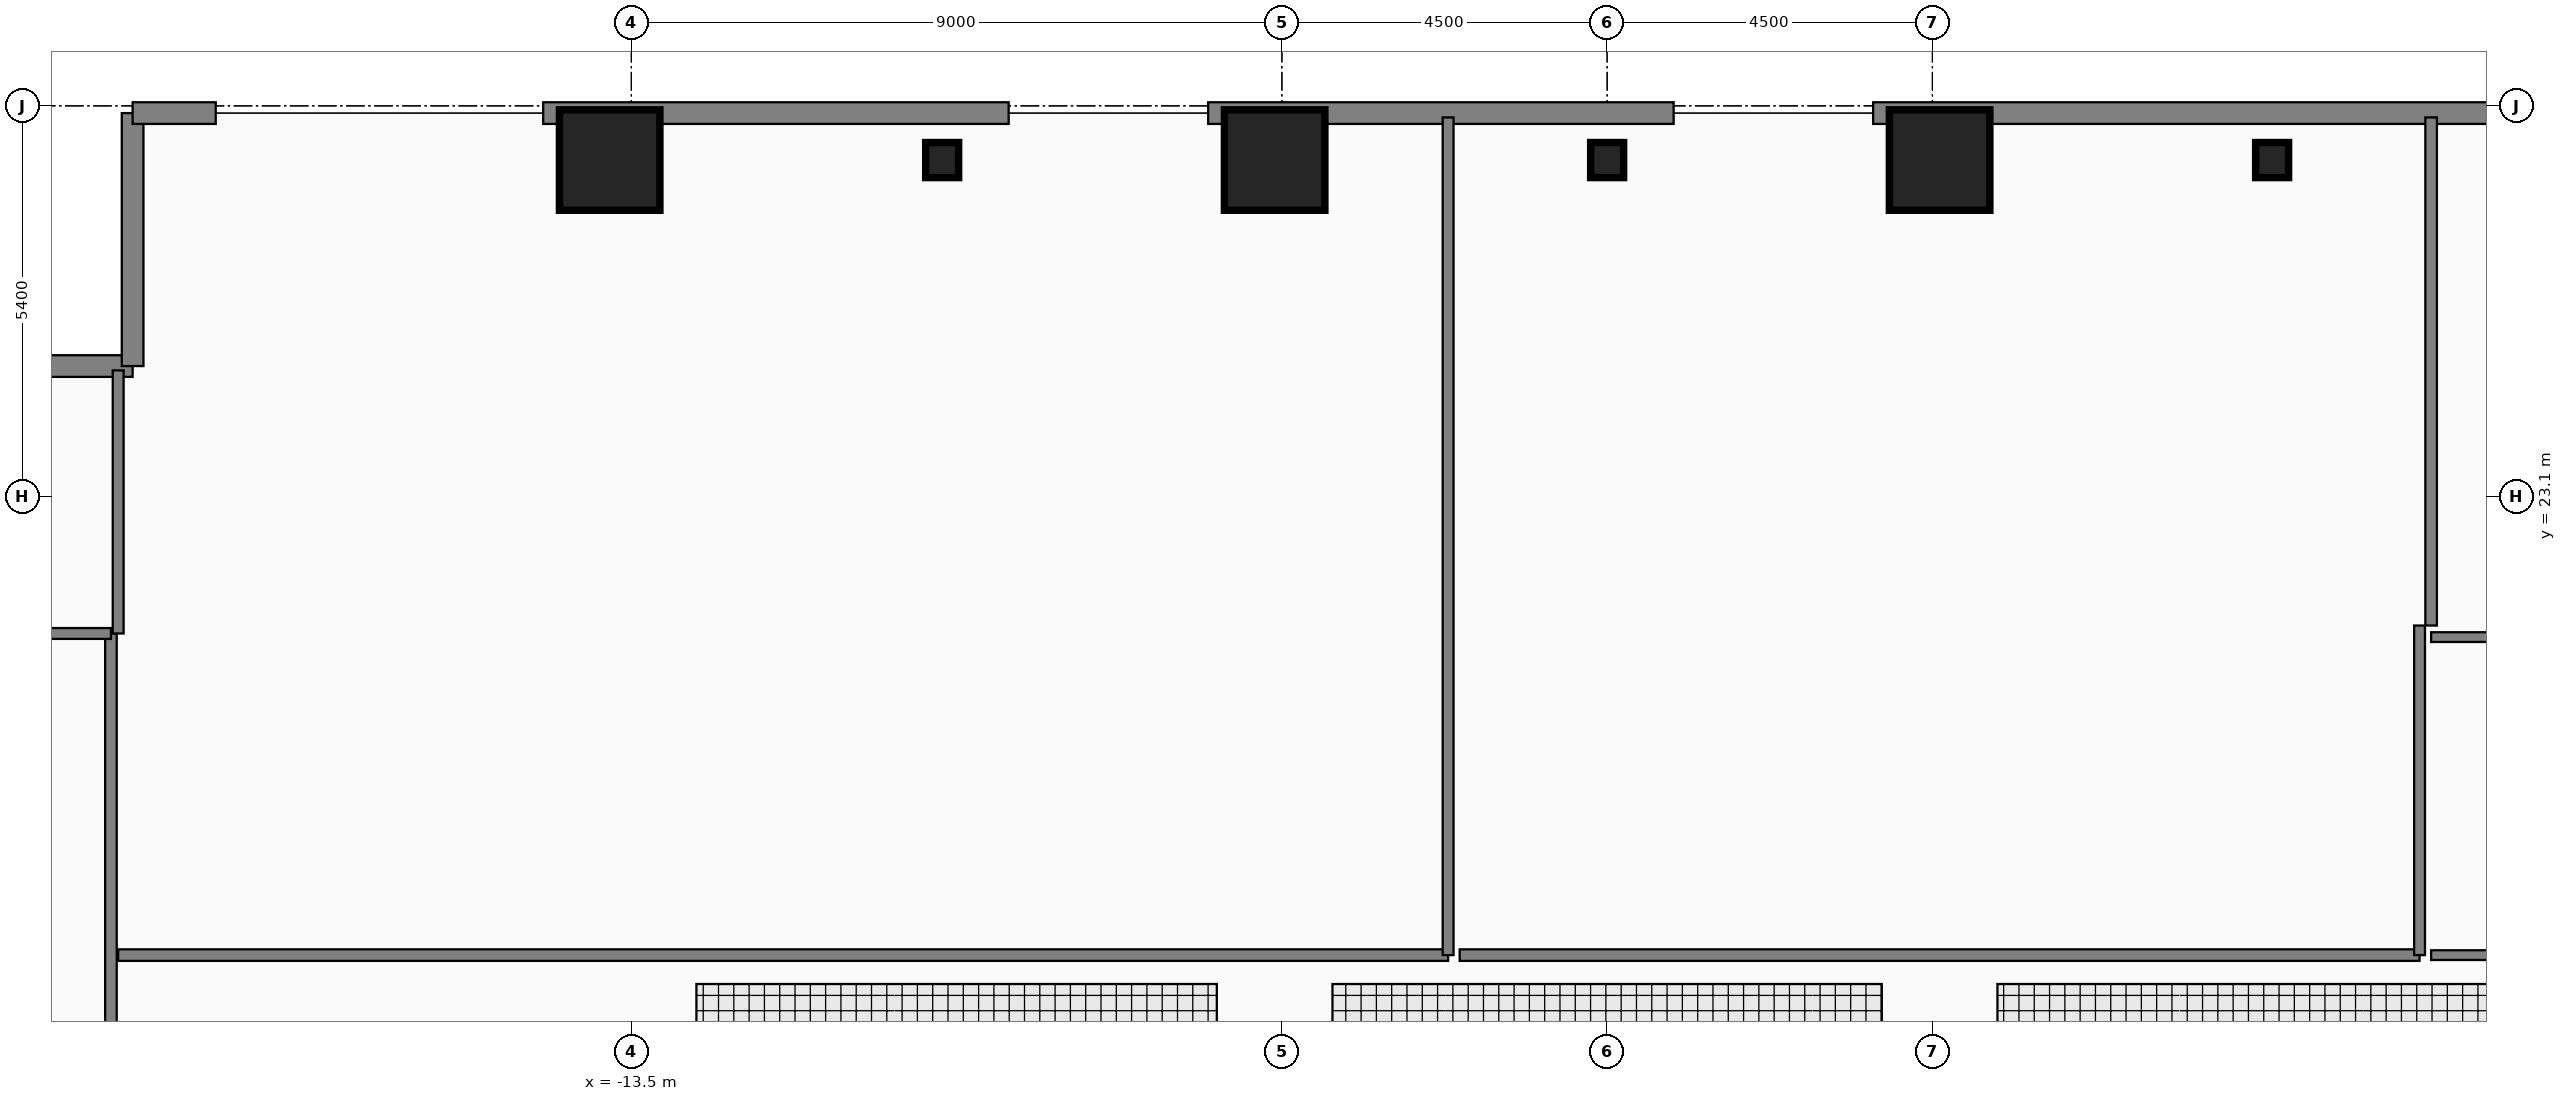
"""IFC4 building model, lengths in metres.
Left out: names, types, materials, properties, quantities, classifications, styles, units other than length and angle.
Written with IfcOpenShell. Run it as: python <this file> out.ifc"""

import sys

from ifc_helpers import new_model, si_unit, direction, frame, frame_2d, origin, origin_2d, place, context, subcontext, project, spatial, rectangle, i_section, extrude, element, fill, save


model = new_model("IFC4")
c1 = context("Model", 3, precision=1e-05, world=origin(), true_north=direction((0.0, 1.0)))
c2 = subcontext(c1, "Body", "Model", "MODEL_VIEW")
j1 = project(units=[si_unit("LENGTHUNIT", "METRE"), si_unit("PLANEANGLEUNIT", "RADIAN")], contexts=[c1])
p1 = place(None, origin())
s1 = spatial("IfcSite", under=j1, at=p1, CompositionType="ELEMENT")
p2 = place(p1, origin())
s2 = spatial("IfcBuilding", under=s1, at=p2, CompositionType="ELEMENT")
p3 = place(p2, frame((0.0, 0.0, 154.05)))
s3 = spatial("IfcBuildingStorey", under=s2, at=p3, CompositionType="ELEMENT", Elevation=154.05)
for number, where, z_axis, x_axis in (
    (1, (-13.8, 27.75, 0.0), (0.0, 0.0, 1.0), (1.0, 0.0, 0.0)),
    (2, (-4.6, 27.75, 0.0), (0.0, 0.0, 1.0), (1.0, 0.0, 0.0)),
    (3, (4.6, 27.75, 0.0), (0.0, 0.0, 1.0), (1.0, 0.0, 0.0)),
):
    element("IfcColumn", number, at=place(p3, frame(where, z_axis=z_axis, x_axis=x_axis)), inside=s3, PredefinedType="COLUMN", context=c2, shape_type="SweptSolid", body=[
        extrude(rectangle(XDim=1.35, YDim=1.35, at=origin_2d()), origin(), (0.0, 0.0, 1.0), 4.5),
    ])
for number, where, z_axis, x_axis in (
    (4, (-9.2, 27.75, -0.22), (0.0, 0.0, 1.0), (1.0, 0.0, 0.0)),
    (5, (0.0, 27.75, -0.22), (0.0, 0.0, 1.0), (1.0, 0.0, 0.0)),
    (6, (9.2, 27.75, -0.22), (0.0, 0.0, 1.0), (1.0, 0.0, 0.0)),
):
    element("IfcColumn", number, at=place(p3, frame(where, z_axis=z_axis, x_axis=x_axis)), inside=s3, PredefinedType="PILASTER", context=c2, shape_type="SweptSolid", body=[
        extrude(i_section(OverallWidth=0.416, OverallDepth=0.445, WebThickness=0.039, FlangeThickness=0.063, at=origin_2d()), origin(), (0.0, 0.0, 1.0), 3.6),
    ])
for number, where, z_axis, x_axis in (
    (7, (-23.9, 24.9, 0.0), (0.0, 0.0, 1.0), (1.0, 0.0, 0.0)),
    (8, (-20.4, 24.9, 0.0), (0.0, 0.0, 1.0), (0.0, 1.0, 0.0)),
):
    element("IfcWall", number, at=place(p3, frame(where, z_axis=z_axis, x_axis=x_axis)), inside=s3, PredefinedType="STANDARD", context=c2, shape_type="SweptSolid", body=[
        extrude(rectangle(XDim=3.5, YDim=0.3, at=frame_2d((1.75, 0.0))), origin(), (0.0, 0.0, 1.0), 4.28),
    ])
p4 = place(p3, frame((-20.4, 28.4, 0.0), z_axis=(0.0, 0.0, 1.0), x_axis=(1.0, 0.0, 0.0)))
e9 = element("IfcWall", 9, at=p4, inside=s3, PredefinedType="STANDARD", context=c2, shape_type="SweptSolid", body=[
    extrude(rectangle(XDim=1.15, YDim=0.3, at=frame_2d((0.575, 0.0))), origin(), (0.0, 0.0, 1.0), 4.28),
])
p5 = place(p3, frame((-14.72, 28.4, 0.0), z_axis=(0.0, 0.0, 1.0), x_axis=(1.0, 0.0, 0.0)))
e10 = element("IfcWall", 10, at=p5, inside=s3, PredefinedType="STANDARD", context=c2, shape_type="SweptSolid", body=[
    extrude(rectangle(XDim=6.44, YDim=0.3, at=frame_2d((3.22, 0.0))), origin(), (0.0, 0.0, 1.0), 4.28),
])
p6 = place(p5, frame((2.12, 0.0, 0.85)))
e11 = element("IfcOpeningElement", 11, at=p6, cuts=e10, PredefinedType="OPENING", context=c2, shape_type="SweptSolid", body=[
    extrude(rectangle(XDim=1.6, YDim=1.8, at=frame_2d((0.8, 0.9))), frame((0.0, 0.16, 0.0), z_axis=(0.0, -1.0, 0.0), x_axis=(1.0, 0.0, 0.0)), (0.0, 0.0, 1.0), 0.32),
])
p7 = place(p3, frame((-5.52, 28.4, 0.0), z_axis=(0.0, 0.0, 1.0), x_axis=(1.0, 0.0, 0.0)))
e12 = element("IfcWall", 12, at=p7, inside=s3, PredefinedType="STANDARD", context=c2, shape_type="SweptSolid", body=[
    extrude(rectangle(XDim=6.44, YDim=0.3, at=frame_2d((3.22, 0.0))), origin(), (0.0, 0.0, 1.0), 4.28),
])
p8 = place(p7, frame((1.835, 0.0, 0.95)))
e13 = element("IfcOpeningElement", 13, at=p8, cuts=e12, PredefinedType="OPENING", context=c2, shape_type="SweptSolid", body=[
    extrude(rectangle(XDim=1.15, YDim=1.55, at=frame_2d((0.575, 0.775))), frame((0.0, 0.16, 0.0), z_axis=(0.0, -1.0, 0.0), x_axis=(1.0, 0.0, 0.0)), (0.0, 0.0, 1.0), 0.32),
])
p9 = place(p3, frame((3.68, 28.4, 0.0), z_axis=(0.0, 0.0, 1.0), x_axis=(1.0, 0.0, 0.0)))
e14 = element("IfcWall", 14, at=p9, inside=s3, PredefinedType="STANDARD", context=c2, shape_type="SweptSolid", body=[
    extrude(rectangle(XDim=11.04, YDim=0.3, at=frame_2d((5.52, 0.0))), origin(), (0.0, 0.0, 1.0), 4.28),
])
p10 = place(p9, frame((2.895, 0.0, 0.0)))
e15 = element("IfcOpeningElement", 15, at=p10, cuts=e14, PredefinedType="OPENING", context=c2, shape_type="SweptSolid", body=[
    extrude(rectangle(XDim=1.05, YDim=2.2, at=frame_2d((0.525, 1.1))), frame((0.0, 0.16, 0.0), z_axis=(0.0, -1.0, 0.0), x_axis=(1.0, 0.0, 0.0)), (0.0, 0.0, 1.0), 0.32),
])
p11 = place(p9, frame((8.055, 0.0, 0.95)))
e16 = element("IfcOpeningElement", 16, at=p11, cuts=e14, PredefinedType="OPENING", context=c2, shape_type="SweptSolid", body=[
    extrude(rectangle(XDim=1.15, YDim=1.55, at=frame_2d((0.575, 0.775))), frame((0.0, 0.16, 0.0), z_axis=(0.0, -1.0, 0.0), x_axis=(1.0, 0.0, 0.0)), (0.0, 0.0, 1.0), 0.32),
])
p12 = place(p3, frame((-20.6, 16.75, 0.0), z_axis=(0.0, 0.0, 1.0), x_axis=(1.0, 0.0, 0.0)))
e17 = element("IfcWall", 17, at=p12, inside=s3, PredefinedType="PARTITIONING", context=c2, shape_type="SweptSolid", body=[
    extrude(rectangle(XDim=18.4, YDim=0.16, at=frame_2d((9.2, 0.0))), origin(), (0.0, 0.0, 1.0), 3.823),
])
p13 = place(p12, frame((8.66, 0.0, 0.0)))
e18 = element("IfcOpeningElement", 18, at=p13, cuts=e17, PredefinedType="OPENING", context=c2, shape_type="SweptSolid", body=[
    extrude(rectangle(XDim=1.08, YDim=2.18, at=frame_2d((0.54, 1.09))), frame((0.0, 0.09, 0.0), z_axis=(0.0, -1.0, 0.0), x_axis=(1.0, 0.0, 0.0)), (0.0, 0.0, 1.0), 0.18),
])
p14 = place(p3, frame((-2.04, 16.75, 0.0), z_axis=(0.0, 0.0, 1.0), x_axis=(1.0, 0.0, 0.0)))
e19 = element("IfcWall", 19, at=p14, inside=s3, PredefinedType="PARTITIONING", context=c2, shape_type="SweptSolid", body=[
    extrude(rectangle(XDim=13.28, YDim=0.16, at=frame_2d((6.64, 0.0))), origin(), (0.0, 0.0, 1.0), 3.823),
])
p15 = place(p14, frame((8.45, 0.0, 0.0)))
e20 = element("IfcOpeningElement", 20, at=p15, cuts=e19, PredefinedType="OPENING", context=c2, shape_type="SweptSolid", body=[
    extrude(rectangle(XDim=1.08, YDim=2.18, at=frame_2d((0.54, 1.09))), frame((0.0, 0.09, 0.0), z_axis=(0.0, -1.0, 0.0), x_axis=(1.0, 0.0, 0.0)), (0.0, 0.0, 1.0), 0.18),
])
p16 = place(p3, frame((-20.7, -6.2, 0.0), z_axis=(0.0, 0.0, 1.0), x_axis=(0.0, 1.0, 0.0)))
e21 = element("IfcWall", 21, at=p16, inside=s3, PredefinedType="PARTITIONING", context=c2, shape_type="SweptSolid", body=[
    extrude(rectangle(XDim=27.4, YDim=0.16, at=frame_2d((13.7, 0.0))), origin(), (0.0, 0.0, 1.0), 4.28),
])
p17 = place(p16, frame((13.16, 0.0, 0.0)))
e22 = element("IfcOpeningElement", 22, at=p17, cuts=e21, PredefinedType="OPENING", context=c2, shape_type="SweptSolid", body=[
    extrude(rectangle(XDim=1.08, YDim=2.18, at=frame_2d((0.54, 1.09))), frame((0.0, 0.09, 0.0), z_axis=(0.0, -1.0, 0.0), x_axis=(1.0, 0.0, 0.0)), (0.0, 0.0, 1.0), 0.18),
])
p18 = place(p3, frame((11.4, 16.75, 0.0), z_axis=(0.0, 0.0, 1.0), x_axis=(1.0, 0.0, 0.0)))
e23 = element("IfcWall", 23, at=p18, inside=s3, PredefinedType="PLUMBINGWALL", context=c2, shape_type="SweptSolid", body=[
    extrude(rectangle(XDim=2.4, YDim=0.135, at=frame_2d((1.2, 0.0))), origin(), (0.0, 0.0, 1.0), 3.823),
])
p19 = place(p18, frame((0.74, 0.0, 0.0)))
e24 = element("IfcOpeningElement", 24, at=p19, cuts=e23, PredefinedType="OPENING", context=c2, shape_type="SweptSolid", body=[
    extrude(rectangle(XDim=0.92, YDim=2.12, at=frame_2d((0.46, 1.06))), frame((0.0, 0.077, 0.0), z_axis=(0.0, -1.0, 0.0), x_axis=(1.0, 0.0, 0.0)), (0.0, 0.0, 1.0), 0.155),
])
p20 = place(p3, frame((11.4, 21.31, 0.0), z_axis=(0.0, 0.0, 1.0), x_axis=(0.0, 1.0, 0.0)))
e25 = element("IfcWall", 25, at=p20, inside=s3, PredefinedType="PARTITIONING", context=c2, shape_type="SweptSolid", body=[
    extrude(rectangle(XDim=7.03, YDim=0.16, at=frame_2d((3.515, 0.0))), origin(), (0.0, 0.0, 1.0), 4.28),
])
p21 = place(p20, frame((2.975, 0.0, 0.0)))
e26 = element("IfcOpeningElement", 26, at=p21, cuts=e25, PredefinedType="OPENING", context=c2, shape_type="SweptSolid", body=[
    extrude(rectangle(XDim=1.08, YDim=2.18, at=frame_2d((0.54, 1.09))), frame((0.0, 0.09, 0.0), z_axis=(0.0, -1.0, 0.0), x_axis=(1.0, 0.0, 0.0)), (0.0, 0.0, 1.0), 0.18),
])
p22 = place(p3, frame((-20.6, 21.2, 0.0), z_axis=(0.0, 0.0, 1.0), x_axis=(0.0, 1.0, 0.0)))
e27 = element("IfcWall", 27, at=p22, inside=s3, PredefinedType="PARTITIONING", context=c2, shape_type="SweptSolid", body=[
    extrude(rectangle(XDim=3.64, YDim=0.15, at=frame_2d((1.82, 0.0))), origin(), (0.0, 0.0, 1.0), 4.28),
])
p23 = place(p3, frame((-2.2, 16.75, 0.0), z_axis=(0.0, 0.0, 1.0), x_axis=(0.0, 1.0, 0.0)))
e28 = element("IfcWall", 28, at=p23, inside=s3, PredefinedType="PARTITIONING", context=c2, shape_type="SweptSolid", body=[
    extrude(rectangle(XDim=11.59, YDim=0.15, at=frame_2d((5.795, 0.0))), origin(), (0.0, 0.0, 1.0), 4.28),
])
p24 = place(p3, frame((11.24, 16.75, 0.0), z_axis=(0.0, 0.0, 1.0), x_axis=(0.0, 1.0, 0.0)))
e29 = element("IfcWall", 29, at=p24, inside=s3, PredefinedType="PARTITIONING", context=c2, shape_type="SweptSolid", body=[
    extrude(rectangle(XDim=4.56, YDim=0.15, at=frame_2d((2.28, 0.0))), origin(), (0.0, 0.0, 1.0), 4.28),
])
p25 = place(p3, frame((-23.84, 21.2, 0.0), z_axis=(0.0, 0.0, 1.0), x_axis=(1.0, 0.0, 0.0)))
e30 = element("IfcWall", 30, at=p25, inside=s3, PredefinedType="PARTITIONING", context=c2, shape_type="SweptSolid", body=[
    extrude(rectangle(XDim=3.14, YDim=0.15, at=frame_2d((1.57, 0.0))), origin(), (0.0, 0.0, 1.0), 4.28),
])
p26 = place(p3, frame((11.4, 21.15, 0.0), z_axis=(0.0, 0.0, 1.0), x_axis=(1.0, 0.0, 0.0)))
e31 = element("IfcWall", 31, at=p26, inside=s3, PredefinedType="PLUMBINGWALL", context=c2, shape_type="SweptSolid", body=[
    extrude(rectangle(XDim=4.8, YDim=0.135, at=frame_2d((2.4, 0.0))), origin(), (0.0, 0.0, 1.0), 4.28),
])
p27 = place(p6, origin())
e32 = element("IfcWindow", 32, at=p27, inside=s3, PartitioningType="SINGLE_PANEL", PredefinedType="WINDOW", context=c2, shape_type="SweptSolid", body=[
    extrude(rectangle(XDim=1.6, YDim=1.8, at=frame_2d((0.8, 0.9))), frame((0.0, 0.03, 0.0), z_axis=(0.0, -1.0, 0.0), x_axis=(1.0, 0.0, 0.0)), (0.0, 0.0, 1.0), 0.06),
])
fill(e11, e32)
p28 = place(p8, origin())
e33 = element("IfcWindow", 33, at=p28, inside=s3, PartitioningType="SINGLE_PANEL", PredefinedType="WINDOW", context=c2, shape_type="SweptSolid", body=[
    extrude(rectangle(XDim=1.15, YDim=1.55, at=frame_2d((0.575, 0.775))), frame((0.0, 0.03, 0.0), z_axis=(0.0, -1.0, 0.0), x_axis=(1.0, 0.0, 0.0)), (0.0, 0.0, 1.0), 0.06),
])
fill(e13, e33)
p29 = place(p10, origin())
e34 = element("IfcDoor", 34, at=p29, inside=s3, OperationType="SINGLE_SWING_LEFT", PredefinedType="DOOR", context=c2, shape_type="SweptSolid", body=[
    extrude(rectangle(XDim=1.05, YDim=2.2, at=frame_2d((0.525, 1.1))), frame((0.0, 0.025, 0.0), z_axis=(0.0, -1.0, 0.0), x_axis=(1.0, 0.0, 0.0)), (0.0, 0.0, 1.0), 0.05),
])
fill(e15, e34)
p30 = place(p11, origin())
e35 = element("IfcWindow", 35, at=p30, inside=s3, PartitioningType="SINGLE_PANEL", PredefinedType="WINDOW", context=c2, shape_type="SweptSolid", body=[
    extrude(rectangle(XDim=1.15, YDim=1.55, at=frame_2d((0.575, 0.775))), frame((0.0, 0.03, 0.0), z_axis=(0.0, -1.0, 0.0), x_axis=(1.0, 0.0, 0.0)), (0.0, 0.0, 1.0), 0.06),
])
fill(e16, e35)
p31 = place(p13, origin())
e36 = element("IfcDoor", 36, at=p31, inside=s3, OperationType="SINGLE_SWING_LEFT", PredefinedType="DOOR", context=c2, shape_type="SweptSolid", body=[
    extrude(rectangle(XDim=1.08, YDim=2.18, at=frame_2d((0.54, 1.09))), frame((0.0, 0.025, 0.0), z_axis=(0.0, -1.0, 0.0), x_axis=(1.0, 0.0, 0.0)), (0.0, 0.0, 1.0), 0.05),
])
fill(e18, e36)
p32 = place(p15, origin())
e37 = element("IfcDoor", 37, at=p32, inside=s3, OperationType="SINGLE_SWING_RIGHT", PredefinedType="DOOR", context=c2, shape_type="SweptSolid", body=[
    extrude(rectangle(XDim=1.08, YDim=2.18, at=frame_2d((0.54, 1.09))), frame((0.0, 0.025, 0.0), z_axis=(0.0, -1.0, 0.0), x_axis=(1.0, 0.0, 0.0)), (0.0, 0.0, 1.0), 0.05),
])
fill(e20, e37)
p33 = place(p19, origin())
e38 = element("IfcDoor", 38, at=p33, inside=s3, OperationType="SINGLE_SWING_RIGHT", PredefinedType="DOOR", context=c2, shape_type="SweptSolid", body=[
    extrude(rectangle(XDim=0.92, YDim=2.12, at=frame_2d((0.46, 1.06))), frame((0.0, 0.025, 0.0), z_axis=(0.0, -1.0, 0.0), x_axis=(1.0, 0.0, 0.0)), (0.0, 0.0, 1.0), 0.05),
])
fill(e24, e38)
p34 = place(p21, origin())
e39 = element("IfcDoor", 39, at=p34, inside=s3, OperationType="SINGLE_SWING_RIGHT", PredefinedType="DOOR", context=c2, shape_type="SweptSolid", body=[
    extrude(rectangle(XDim=1.08, YDim=2.18, at=frame_2d((0.54, 1.09))), frame((0.0, 0.025, 0.0), z_axis=(0.0, -1.0, 0.0), x_axis=(1.0, 0.0, 0.0)), (0.0, 0.0, 1.0), 0.05),
])
fill(e26, e39)
save(model, sys.argv[1])
